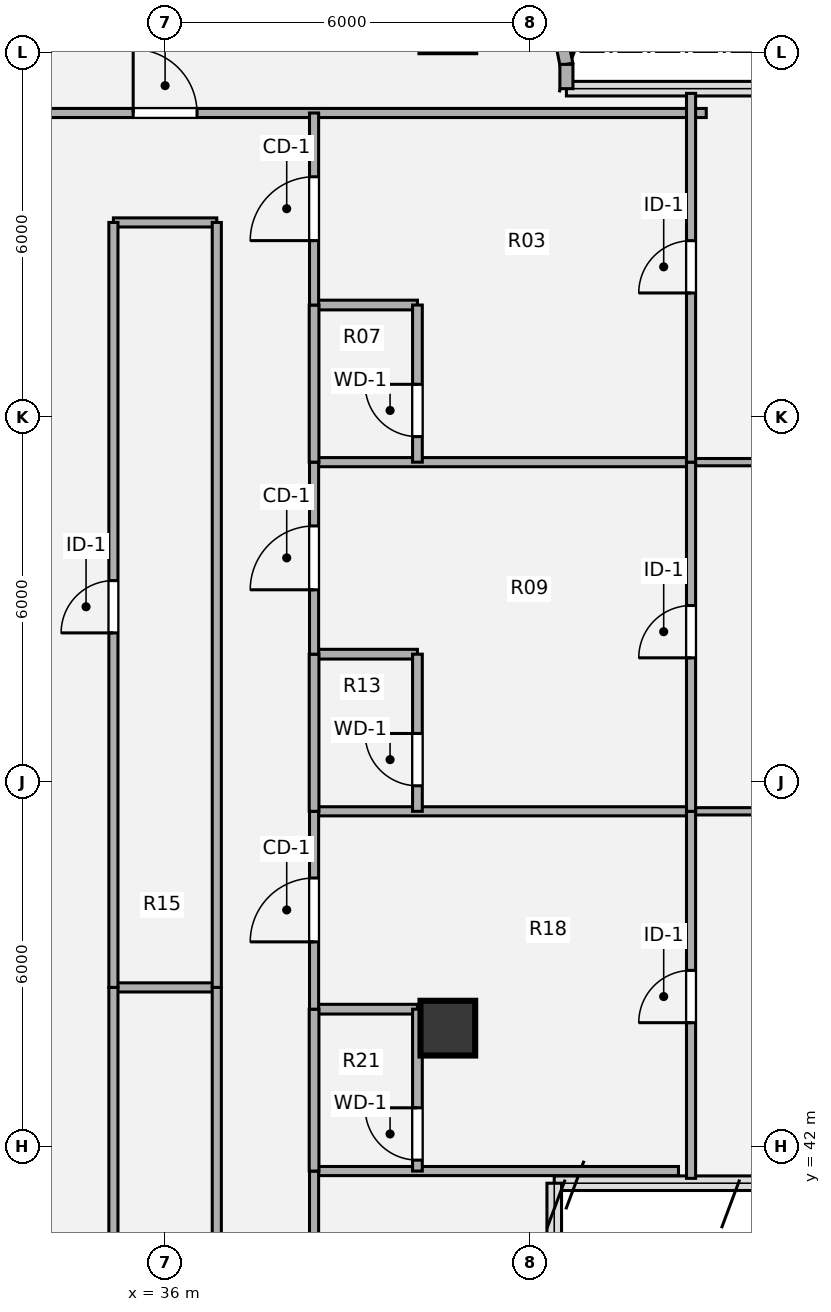
"""IFC4 building model, lengths in metres.
Left out: names, types, materials, properties, quantities, classifications, styles, units other than length and angle.
Written with IfcOpenShell. Run it as: python <this file> out.ifc"""

import sys

from ifc_helpers import new_model, si_unit, direction, frame, frame_2d, origin, origin_2d, place, context, subcontext, project, spatial, rectangle, hollow_circle, extrude, source, transform, mapped, element, fill, save


model = new_model("IFC4")
c1 = context("Model", 3, precision=1e-05, world=origin(), true_north=direction((0.0, 1.0)))
c2 = subcontext(c1, "Body", "Model", "MODEL_VIEW")
j1 = project(units=[si_unit("LENGTHUNIT", "METRE"), si_unit("PLANEANGLEUNIT", "RADIAN")], contexts=[c1])
p1 = place(None, origin())
s1 = spatial("IfcSite", under=j1, at=p1, CompositionType="ELEMENT")
p2 = place(p1, origin())
s2 = spatial("IfcBuilding", under=s1, at=p2, CompositionType="ELEMENT")
p3 = place(p2, frame((0.0, 0.0, 238.14)))
s3 = spatial("IfcBuildingStorey", under=s2, at=p3, CompositionType="ELEMENT", Elevation=238.14)
m1 = source(origin(), c2, "Body", "SweptSolid", [
    extrude(hollow_circle(Radius=0.45, WallThickness=0.032, at=origin_2d()), origin(), (0.0, 0.0, 1.0), 3.78),
])
p4 = place(p3, frame((40.65, 43.95, 0.0), z_axis=(0.0, 0.0, 1.0), x_axis=(1.0, 0.0, 0.0)))
e1 = element("IfcColumn", 1, at=p4, inside=s3, PredefinedType="COLUMN", context=c2, shape_type="MappedRepresentation", body=[
    mapped(m1, transform((0.0, 0.0, 0.0), x_axis=(1.0, 0.0, 0.0), y_axis=(0.0, 1.0, 0.0), z_axis=(0.0, 0.0, 1.0), scale=1.0)),
])
p5 = place(p3, frame((42.402, 60.795, 0.0), z_axis=(0.0, 0.0, 1.0), x_axis=(0.195190360752, -0.980765376158, 0.0)))
e2 = element("IfcWall", 2, at=p5, inside=s3, PredefinedType="SOLIDWALL", context=c2, shape_type="SweptSolid", body=[
    extrude(rectangle(XDim=1.014, YDim=0.215, at=frame_2d((0.507, 0.0))), origin(), (0.0, 0.0, 1.0), 3.53),
])
p6 = place(p3, frame((42.6, 59.8, 0.0), z_axis=(0.0, 0.0, 1.0), x_axis=(0.0, -1.0, 0.0)))
e3 = element("IfcWall", 3, at=p6, inside=s3, PredefinedType="SOLIDWALL", context=c2, shape_type="SweptSolid", body=[
    extrude(rectangle(XDim=0.4, YDim=0.215, at=frame_2d((0.2, 0.0))), origin(), (0.0, 0.0, 1.0), 3.53),
])
p7 = place(p3, frame((38.45, 41.6, 0.0), z_axis=(0.0, 0.0, 1.0), x_axis=(1.0, 0.0, 0.0)))
e4 = element("IfcWall", 4, at=p7, inside=s3, PredefinedType="PARTITIONING", context=c2, shape_type="SweptSolid", body=[
    extrude(rectangle(XDim=5.993, YDim=0.15, at=frame_2d((2.997, 0.0))), origin(), (0.0, 0.0, 1.0), 3.5),
])
p8 = place(p3, frame((38.45, 44.262, 0.0), z_axis=(0.0, 0.0, 1.0), x_axis=(1.0, 0.0, 0.0)))
e5 = element("IfcWall", 5, at=p8, inside=s3, PredefinedType="PLUMBINGWALL", context=c2, shape_type="SweptSolid", body=[
    extrude(rectangle(XDim=1.7, YDim=0.16, at=frame_2d((0.85, 0.0))), origin(), (0.0, 0.0, 1.0), 2.903),
])
p9 = place(p3, frame((35.15, 44.62, 0.0), z_axis=(0.0, 0.0, 1.0), x_axis=(1.0, 0.0, 0.0)))
e6 = element("IfcWall", 6, at=p9, inside=s3, PredefinedType="PARTITIONING", context=c2, shape_type="SweptSolid", body=[
    extrude(rectangle(XDim=1.7, YDim=0.15, at=frame_2d((0.85, 0.0))), origin(), (0.0, 0.0, 1.0), 3.259),
])
p10 = place(p3, frame((38.45, 47.516, 0.0), z_axis=(0.0, 0.0, 1.0), x_axis=(1.0, 0.0, 0.0)))
e7 = element("IfcWall", 7, at=p10, inside=s3, PredefinedType="PARTITIONING", context=c2, shape_type="SweptSolid", body=[
    extrude(rectangle(XDim=6.2, YDim=0.15, at=frame_2d((3.1, 0.0))), origin(), (0.0, 0.0, 1.0), 2.982),
])
p11 = place(p3, frame((44.65, 47.516, 0.0), z_axis=(0.0, 0.0, 1.0), x_axis=(1.0, 0.0, 0.0)))
e8 = element("IfcWall", 8, at=p11, inside=s3, PredefinedType="PARTITIONING", context=c2, shape_type="SweptSolid", body=[
    extrude(rectangle(XDim=9.57, YDim=0.12, at=frame_2d((4.785, 0.0))), origin(), (0.0, 0.0, 1.0), 2.982),
])
p12 = place(p3, frame((38.45, 50.1, 0.0), z_axis=(0.0, 0.0, 1.0), x_axis=(1.0, 0.0, 0.0)))
e9 = element("IfcWall", 9, at=p12, inside=s3, PredefinedType="PLUMBINGWALL", context=c2, shape_type="SweptSolid", body=[
    extrude(rectangle(XDim=1.7, YDim=0.16, at=frame_2d((0.85, 0.0))), origin(), (0.0, 0.0, 1.0), 3.259),
])
p13 = place(p3, frame((38.45, 53.258, 0.0), z_axis=(0.0, 0.0, 1.0), x_axis=(1.0, 0.0, 0.0)))
e10 = element("IfcWall", 10, at=p13, inside=s3, PredefinedType="PARTITIONING", context=c2, shape_type="SweptSolid", body=[
    extrude(rectangle(XDim=6.2, YDim=0.15, at=frame_2d((3.1, 0.0))), origin(), (0.0, 0.0, 1.0), 3.055),
])
p14 = place(p3, frame((44.65, 53.258, 0.0), z_axis=(0.0, 0.0, 1.0), x_axis=(1.0, 0.0, 0.0)))
e11 = element("IfcWall", 11, at=p14, inside=s3, PredefinedType="PARTITIONING", context=c2, shape_type="SweptSolid", body=[
    extrude(rectangle(XDim=9.57, YDim=0.12, at=frame_2d((4.785, 0.0))), origin(), (0.0, 0.0, 1.0), 3.055),
])
p15 = place(p3, frame((38.45, 55.842, 0.0), z_axis=(0.0, 0.0, 1.0), x_axis=(1.0, 0.0, 0.0)))
e12 = element("IfcWall", 12, at=p15, inside=s3, PredefinedType="PLUMBINGWALL", context=c2, shape_type="SweptSolid", body=[
    extrude(rectangle(XDim=1.7, YDim=0.16, at=frame_2d((0.85, 0.0))), origin(), (0.0, 0.0, 1.0), 3.259),
])
p16 = place(p3, frame((35.15, 57.2, 0.0), z_axis=(0.0, 0.0, 1.0), x_axis=(1.0, 0.0, 0.0)))
e13 = element("IfcWall", 13, at=p16, inside=s3, PredefinedType="PARTITIONING", context=c2, shape_type="SweptSolid", body=[
    extrude(rectangle(XDim=1.7, YDim=0.15, at=frame_2d((0.85, 0.0))), origin(), (0.0, 0.0, 1.0), 3.308),
])
p17 = place(p3, frame((27.1, 59.0, 0.0), z_axis=(0.0, 0.0, 1.0), x_axis=(1.0, 0.0, 0.0)))
e14 = element("IfcWall", 14, at=p17, inside=s3, PredefinedType="PARTITIONING", context=c2, shape_type="SweptSolid", body=[
    extrude(rectangle(XDim=17.8, YDim=0.15, at=frame_2d((8.9, 0.0))), origin(), (0.0, 0.0, 1.0), 3.308),
])
p18 = place(p17, frame((8.375, 0.0, 0.0)))
e15 = element("IfcOpeningElement", 15, at=p18, cuts=e14, PredefinedType="OPENING", context=c2, shape_type="SweptSolid", body=[
    extrude(rectangle(XDim=1.05, YDim=2.1, at=origin_2d()), frame((0.525, 0.085, 1.05), z_axis=(0.0, -1.0, 0.0), x_axis=(1.0, 0.0, 0.0)), (0.0, 0.0, 1.0), 0.17),
])
p19 = place(p3, frame((35.15, 25.2, 0.0), z_axis=(0.0, 0.0, 1.0), x_axis=(0.0, 1.0, 0.0)))
e16 = element("IfcWall", 16, at=p19, inside=s3, PredefinedType="PARTITIONING", context=c2, shape_type="SweptSolid", body=[
    extrude(rectangle(XDim=19.42, YDim=0.15, at=frame_2d((9.71, 0.0))), origin(), (0.0, 0.0, 1.0), 3.5),
])
p20 = place(p3, frame((35.15, 44.62, 0.0), z_axis=(0.0, 0.0, 1.0), x_axis=(0.0, 1.0, 0.0)))
e17 = element("IfcWall", 17, at=p20, inside=s3, PredefinedType="PARTITIONING", context=c2, shape_type="SweptSolid", body=[
    extrude(rectangle(XDim=12.58, YDim=0.15, at=frame_2d((6.29, 0.0))), origin(), (0.0, 0.0, 1.0), 3.5),
])
p21 = place(p20, frame((5.83, 0.0, 0.0)))
e18 = element("IfcOpeningElement", 18, at=p21, cuts=e17, PredefinedType="OPENING", context=c2, shape_type="SweptSolid", body=[
    extrude(rectangle(XDim=0.86, YDim=2.1, at=origin_2d()), frame((0.43, 0.085, 1.05), z_axis=(0.0, -1.0, 0.0), x_axis=(1.0, 0.0, 0.0)), (0.0, 0.0, 1.0), 0.17),
])
p22 = place(p3, frame((36.85, 25.2, 0.0), z_axis=(0.0, 0.0, 1.0), x_axis=(0.0, 1.0, 0.0)))
e19 = element("IfcWall", 19, at=p22, inside=s3, PredefinedType="PARTITIONING", context=c2, shape_type="SweptSolid", body=[
    extrude(rectangle(XDim=19.42, YDim=0.15, at=frame_2d((9.71, 0.0))), origin(), (0.0, 0.0, 1.0), 3.5),
])
p23 = place(p22, frame((9.185, 0.0, 0.0)))
e20 = element("IfcOpeningElement", 20, at=p23, cuts=e19, PredefinedType="OPENING", context=c2, shape_type="SweptSolid", body=[
    extrude(rectangle(XDim=1.05, YDim=2.1, at=origin_2d()), frame((0.525, 0.085, 1.05), z_axis=(0.0, -1.0, 0.0), x_axis=(1.0, 0.0, 0.0)), (0.0, 0.0, 1.0), 0.17),
])
p24 = place(p3, frame((36.85, 44.62, 0.0), z_axis=(0.0, 0.0, 1.0), x_axis=(0.0, 1.0, 0.0)))
e21 = element("IfcWall", 21, at=p24, inside=s3, PredefinedType="PARTITIONING", context=c2, shape_type="SweptSolid", body=[
    extrude(rectangle(XDim=12.58, YDim=0.15, at=frame_2d((6.29, 0.0))), origin(), (0.0, 0.0, 1.0), 3.5),
])
p25 = place(p3, frame((38.45, 21.2, 0.0), z_axis=(0.0, 0.0, 1.0), x_axis=(0.0, 1.0, 0.0)))
e22 = element("IfcWall", 22, at=p25, inside=s3, PredefinedType="PARTITIONING", context=c2, shape_type="SweptSolid", body=[
    extrude(rectangle(XDim=20.4, YDim=0.15, at=frame_2d((10.2, 0.0))), origin(), (0.0, 0.0, 1.0), 3.5),
])
p26 = place(p25, frame((9.575, 0.0, 0.0)))
e23 = element("IfcOpeningElement", 23, at=p26, cuts=e22, PredefinedType="OPENING", context=c2, shape_type="SweptSolid", body=[
    extrude(rectangle(XDim=1.05, YDim=2.1, at=origin_2d()), frame((0.525, 0.085, 1.05), z_axis=(0.0, -1.0, 0.0), x_axis=(1.0, 0.0, 0.0)), (0.0, 0.0, 1.0), 0.17),
])
p27 = place(p3, frame((38.45, 41.6, 0.0), z_axis=(0.0, 0.0, 1.0), x_axis=(0.0, 1.0, 0.0)))
e24 = element("IfcWall", 24, at=p27, inside=s3, PredefinedType="PLUMBINGWALL", context=c2, shape_type="SweptSolid", body=[
    extrude(rectangle(XDim=2.662, YDim=0.16, at=frame_2d((1.331, 0.0))), origin(), (0.0, 0.0, 1.0), 3.5),
])
p28 = place(p3, frame((38.45, 44.262, 0.0), z_axis=(0.0, 0.0, 1.0), x_axis=(0.0, 1.0, 0.0)))
e25 = element("IfcWall", 25, at=p28, inside=s3, PredefinedType="PARTITIONING", context=c2, shape_type="SweptSolid", body=[
    extrude(rectangle(XDim=3.254, YDim=0.15, at=frame_2d((1.627, 0.0))), origin(), (0.0, 0.0, 1.0), 3.5),
])
p29 = place(p28, frame((1.107, 0.0, 0.0)))
e26 = element("IfcOpeningElement", 26, at=p29, cuts=e25, PredefinedType="OPENING", context=c2, shape_type="SweptSolid", body=[
    extrude(rectangle(XDim=1.05, YDim=2.1, at=origin_2d()), frame((0.525, 0.085, 1.05), z_axis=(0.0, -1.0, 0.0), x_axis=(1.0, 0.0, 0.0)), (0.0, 0.0, 1.0), 0.17),
])
p30 = place(p3, frame((38.45, 47.516, 0.0), z_axis=(0.0, 0.0, 1.0), x_axis=(0.0, 1.0, 0.0)))
e27 = element("IfcWall", 27, at=p30, inside=s3, PredefinedType="PLUMBINGWALL", context=c2, shape_type="SweptSolid", body=[
    extrude(rectangle(XDim=2.584, YDim=0.16, at=frame_2d((1.292, 0.0))), origin(), (0.0, 0.0, 1.0), 3.5),
])
p31 = place(p3, frame((38.45, 50.1, 0.0), z_axis=(0.0, 0.0, 1.0), x_axis=(0.0, 1.0, 0.0)))
e28 = element("IfcWall", 28, at=p31, inside=s3, PredefinedType="PARTITIONING", context=c2, shape_type="SweptSolid", body=[
    extrude(rectangle(XDim=3.158, YDim=0.15, at=frame_2d((1.579, 0.0))), origin(), (0.0, 0.0, 1.0), 3.5),
])
p32 = place(p31, frame((1.059, 0.0, 0.0)))
e29 = element("IfcOpeningElement", 29, at=p32, cuts=e28, PredefinedType="OPENING", context=c2, shape_type="SweptSolid", body=[
    extrude(rectangle(XDim=1.05, YDim=2.1, at=origin_2d()), frame((0.525, 0.085, 1.05), z_axis=(0.0, -1.0, 0.0), x_axis=(1.0, 0.0, 0.0)), (0.0, 0.0, 1.0), 0.17),
])
p33 = place(p3, frame((38.45, 53.258, 0.0), z_axis=(0.0, 0.0, 1.0), x_axis=(0.0, 1.0, 0.0)))
e30 = element("IfcWall", 30, at=p33, inside=s3, PredefinedType="PLUMBINGWALL", context=c2, shape_type="SweptSolid", body=[
    extrude(rectangle(XDim=2.584, YDim=0.16, at=frame_2d((1.292, 0.0))), origin(), (0.0, 0.0, 1.0), 3.5),
])
p34 = place(p3, frame((38.45, 55.842, 0.0), z_axis=(0.0, 0.0, 1.0), x_axis=(0.0, 1.0, 0.0)))
e31 = element("IfcWall", 31, at=p34, inside=s3, PredefinedType="PARTITIONING", context=c2, shape_type="SweptSolid", body=[
    extrude(rectangle(XDim=3.158, YDim=0.15, at=frame_2d((1.579, 0.0))), origin(), (0.0, 0.0, 1.0), 3.5),
])
p35 = place(p34, frame((1.059, 0.0, 0.0)))
e32 = element("IfcOpeningElement", 32, at=p35, cuts=e31, PredefinedType="OPENING", context=c2, shape_type="SweptSolid", body=[
    extrude(rectangle(XDim=1.05, YDim=2.1, at=origin_2d()), frame((0.525, 0.085, 1.05), z_axis=(0.0, -1.0, 0.0), x_axis=(1.0, 0.0, 0.0)), (0.0, 0.0, 1.0), 0.17),
])
p36 = place(p3, frame((40.15, 41.6, 0.0), z_axis=(0.0, 0.0, 1.0), x_axis=(0.0, 1.0, 0.0)))
e33 = element("IfcWall", 33, at=p36, inside=s3, PredefinedType="PLUMBINGWALL", context=c2, shape_type="SweptSolid", body=[
    extrude(rectangle(XDim=2.662, YDim=0.16, at=frame_2d((1.331, 0.0))), origin(), (0.0, 0.0, 1.0), 3.5),
])
p37 = place(p36, frame((0.18, 0.0, 0.0)))
e34 = element("IfcOpeningElement", 34, at=p37, cuts=e33, PredefinedType="OPENING", context=c2, shape_type="SweptSolid", body=[
    extrude(rectangle(XDim=0.86, YDim=2.1, at=origin_2d()), frame((0.43, 0.09, 1.05), z_axis=(0.0, -1.0, 0.0), x_axis=(1.0, 0.0, 0.0)), (0.0, 0.0, 1.0), 0.18),
])
p38 = place(p3, frame((40.15, 47.516, 0.0), z_axis=(0.0, 0.0, 1.0), x_axis=(0.0, 1.0, 0.0)))
e35 = element("IfcWall", 35, at=p38, inside=s3, PredefinedType="PLUMBINGWALL", context=c2, shape_type="SweptSolid", body=[
    extrude(rectangle(XDim=2.584, YDim=0.16, at=frame_2d((1.292, 0.0))), origin(), (0.0, 0.0, 1.0), 3.5),
])
p39 = place(p38, frame((0.42, 0.0, 0.0)))
e36 = element("IfcOpeningElement", 36, at=p39, cuts=e35, PredefinedType="OPENING", context=c2, shape_type="SweptSolid", body=[
    extrude(rectangle(XDim=0.86, YDim=2.1, at=origin_2d()), frame((0.43, 0.09, 1.05), z_axis=(0.0, -1.0, 0.0), x_axis=(1.0, 0.0, 0.0)), (0.0, 0.0, 1.0), 0.18),
])
p40 = place(p3, frame((40.15, 53.258, 0.0), z_axis=(0.0, 0.0, 1.0), x_axis=(0.0, 1.0, 0.0)))
e37 = element("IfcWall", 37, at=p40, inside=s3, PredefinedType="PLUMBINGWALL", context=c2, shape_type="SweptSolid", body=[
    extrude(rectangle(XDim=2.584, YDim=0.16, at=frame_2d((1.292, 0.0))), origin(), (0.0, 0.0, 1.0), 3.5),
])
p41 = place(p40, frame((0.42, 0.0, 0.0)))
e38 = element("IfcOpeningElement", 38, at=p41, cuts=e37, PredefinedType="OPENING", context=c2, shape_type="SweptSolid", body=[
    extrude(rectangle(XDim=0.86, YDim=2.1, at=origin_2d()), frame((0.43, 0.09, 1.05), z_axis=(0.0, -1.0, 0.0), x_axis=(1.0, 0.0, 0.0)), (0.0, 0.0, 1.0), 0.18),
])
p42 = place(p3, frame((44.65, 41.48, 0.0), z_axis=(0.0, 0.0, 1.0), x_axis=(0.0, 1.0, 0.0)))
e39 = element("IfcWall", 39, at=p42, inside=s3, PredefinedType="PARTITIONING", context=c2, shape_type="SweptSolid", body=[
    extrude(rectangle(XDim=6.036, YDim=0.15, at=frame_2d((3.018, 0.0))), origin(), (0.0, 0.0, 1.0), 3.5),
])
p43 = place(p42, frame((2.56, 0.0, 0.0)))
e40 = element("IfcOpeningElement", 40, at=p43, cuts=e39, PredefinedType="OPENING", context=c2, shape_type="SweptSolid", body=[
    extrude(rectangle(XDim=0.86, YDim=2.1, at=origin_2d()), frame((0.43, 0.085, 1.05), z_axis=(0.0, -1.0, 0.0), x_axis=(1.0, 0.0, 0.0)), (0.0, 0.0, 1.0), 0.17),
])
p44 = place(p3, frame((44.65, 47.516, 0.0), z_axis=(0.0, 0.0, 1.0), x_axis=(0.0, 1.0, 0.0)))
e41 = element("IfcWall", 41, at=p44, inside=s3, PredefinedType="PARTITIONING", context=c2, shape_type="SweptSolid", body=[
    extrude(rectangle(XDim=5.742, YDim=0.15, at=frame_2d((2.871, 0.0))), origin(), (0.0, 0.0, 1.0), 3.5),
])
p45 = place(p44, frame((2.524, 0.0, 0.0)))
e42 = element("IfcOpeningElement", 42, at=p45, cuts=e41, PredefinedType="OPENING", context=c2, shape_type="SweptSolid", body=[
    extrude(rectangle(XDim=0.86, YDim=2.1, at=origin_2d()), frame((0.43, 0.085, 1.05), z_axis=(0.0, -1.0, 0.0), x_axis=(1.0, 0.0, 0.0)), (0.0, 0.0, 1.0), 0.17),
])
p46 = place(p3, frame((44.65, 53.258, 0.0), z_axis=(0.0, 0.0, 1.0), x_axis=(0.0, 1.0, 0.0)))
e43 = element("IfcWall", 43, at=p46, inside=s3, PredefinedType="PARTITIONING", context=c2, shape_type="SweptSolid", body=[
    extrude(rectangle(XDim=6.064, YDim=0.15, at=frame_2d((3.032, 0.0))), origin(), (0.0, 0.0, 1.0), 3.5),
])
p47 = place(p46, frame((2.782, 0.0, 0.0)))
e44 = element("IfcOpeningElement", 44, at=p47, cuts=e43, PredefinedType="OPENING", context=c2, shape_type="SweptSolid", body=[
    extrude(rectangle(XDim=0.86, YDim=2.1, at=origin_2d()), frame((0.43, 0.085, 1.05), z_axis=(0.0, -1.0, 0.0), x_axis=(1.0, 0.0, 0.0)), (0.0, 0.0, 1.0), 0.17),
])
m2 = source(origin(), c2, "Body", "SweptSolid", [
    extrude(rectangle(XDim=1.05, YDim=2.1, at=origin_2d()), frame((0.525, 0.025, 1.05), z_axis=(0.0, -1.0, 0.0), x_axis=(1.0, 0.0, 0.0)), (0.0, 0.0, 1.0), 0.05),
])
p48 = place(p18, origin())
e45 = element("IfcDoor", 45, at=p48, inside=s3, OperationType="SINGLE_SWING_LEFT", PredefinedType="DOOR", context=c2, shape_type="MappedRepresentation", body=[
    mapped(m2, transform((0.0, 0.0, 0.0), x_axis=(1.0, 0.0, 0.0), y_axis=(0.0, 1.0, 0.0), z_axis=(0.0, 0.0, 1.0), scale=1.0)),
])
fill(e15, e45)
m3 = source(origin(), c2, "Body", "SweptSolid", [
    extrude(rectangle(XDim=0.86, YDim=2.1, at=origin_2d()), frame((0.43, 0.025, 1.05), z_axis=(0.0, -1.0, 0.0), x_axis=(1.0, 0.0, 0.0)), (0.0, 0.0, 1.0), 0.05),
])
p49 = place(p21, origin())
e46 = element("IfcDoor", 46, at=p49, inside=s3, OperationType="SINGLE_SWING_LEFT", PredefinedType="DOOR", context=c2, shape_type="MappedRepresentation", body=[
    mapped(m3, transform((0.0, 0.0, 0.0), x_axis=(1.0, 0.0, 0.0), y_axis=(0.0, 1.0, 0.0), z_axis=(0.0, 0.0, 1.0), scale=1.0)),
])
fill(e18, e46)
m4 = source(origin(), c2, "Body", "SweptSolid", [
    extrude(rectangle(XDim=1.05, YDim=2.1, at=origin_2d()), frame((0.525, 0.025, 1.05), z_axis=(0.0, -1.0, 0.0), x_axis=(1.0, 0.0, 0.0)), (0.0, 0.0, 1.0), 0.05),
])
p50 = place(p29, origin())
e47 = element("IfcDoor", 47, at=p50, inside=s3, OperationType="SINGLE_SWING_LEFT", PredefinedType="DOOR", context=c2, shape_type="MappedRepresentation", body=[
    mapped(m4, transform((0.0, 0.0, 0.0), x_axis=(1.0, 0.0, 0.0), y_axis=(0.0, 1.0, 0.0), z_axis=(0.0, 0.0, 1.0), scale=1.0)),
])
fill(e26, e47)
p51 = place(p32, origin())
e48 = element("IfcDoor", 48, at=p51, inside=s3, OperationType="SINGLE_SWING_LEFT", PredefinedType="DOOR", context=c2, shape_type="MappedRepresentation", body=[
    mapped(m4, transform((0.0, 0.0, 0.0), x_axis=(1.0, 0.0, 0.0), y_axis=(0.0, 1.0, 0.0), z_axis=(0.0, 0.0, 1.0), scale=1.0)),
])
fill(e29, e48)
p52 = place(p35, origin())
e49 = element("IfcDoor", 49, at=p52, inside=s3, OperationType="SINGLE_SWING_LEFT", PredefinedType="DOOR", context=c2, shape_type="MappedRepresentation", body=[
    mapped(m4, transform((0.0, 0.0, 0.0), x_axis=(1.0, 0.0, 0.0), y_axis=(0.0, 1.0, 0.0), z_axis=(0.0, 0.0, 1.0), scale=1.0)),
])
fill(e32, e49)
m5 = source(origin(), c2, "Body", "SweptSolid", [
    extrude(rectangle(XDim=0.86, YDim=2.1, at=origin_2d()), frame((0.43, 0.025, 1.05), z_axis=(0.0, -1.0, 0.0), x_axis=(1.0, 0.0, 0.0)), (0.0, 0.0, 1.0), 0.05),
])
p53 = place(p37, origin())
e50 = element("IfcDoor", 50, at=p53, inside=s3, OperationType="SINGLE_SWING_RIGHT", PredefinedType="DOOR", context=c2, shape_type="MappedRepresentation", body=[
    mapped(m5, transform((0.0, 0.0, 0.0), x_axis=(1.0, 0.0, 0.0), y_axis=(0.0, 1.0, 0.0), z_axis=(0.0, 0.0, 1.0), scale=1.0)),
])
fill(e34, e50)
p54 = place(p39, origin())
e51 = element("IfcDoor", 51, at=p54, inside=s3, OperationType="SINGLE_SWING_RIGHT", PredefinedType="DOOR", context=c2, shape_type="MappedRepresentation", body=[
    mapped(m5, transform((0.0, 0.0, 0.0), x_axis=(1.0, 0.0, 0.0), y_axis=(0.0, 1.0, 0.0), z_axis=(0.0, 0.0, 1.0), scale=1.0)),
])
fill(e36, e51)
p55 = place(p41, origin())
e52 = element("IfcDoor", 52, at=p55, inside=s3, OperationType="SINGLE_SWING_RIGHT", PredefinedType="DOOR", context=c2, shape_type="MappedRepresentation", body=[
    mapped(m5, transform((0.0, 0.0, 0.0), x_axis=(1.0, 0.0, 0.0), y_axis=(0.0, 1.0, 0.0), z_axis=(0.0, 0.0, 1.0), scale=1.0)),
])
fill(e38, e52)
p56 = place(p43, origin())
e53 = element("IfcDoor", 53, at=p56, inside=s3, OperationType="SINGLE_SWING_LEFT", PredefinedType="DOOR", context=c2, shape_type="MappedRepresentation", body=[
    mapped(m3, transform((0.0, 0.0, 0.0), x_axis=(1.0, 0.0, 0.0), y_axis=(0.0, 1.0, 0.0), z_axis=(0.0, 0.0, 1.0), scale=1.0)),
])
fill(e40, e53)
p57 = place(p45, origin())
e54 = element("IfcDoor", 54, at=p57, inside=s3, OperationType="SINGLE_SWING_LEFT", PredefinedType="DOOR", context=c2, shape_type="MappedRepresentation", body=[
    mapped(m3, transform((0.0, 0.0, 0.0), x_axis=(1.0, 0.0, 0.0), y_axis=(0.0, 1.0, 0.0), z_axis=(0.0, 0.0, 1.0), scale=1.0)),
])
fill(e42, e54)
p58 = place(p47, origin())
e55 = element("IfcDoor", 55, at=p58, inside=s3, OperationType="SINGLE_SWING_LEFT", PredefinedType="DOOR", context=c2, shape_type="MappedRepresentation", body=[
    mapped(m3, transform((0.0, 0.0, 0.0), x_axis=(1.0, 0.0, 0.0), y_axis=(0.0, 1.0, 0.0), z_axis=(0.0, 0.0, 1.0), scale=1.0)),
])
fill(e44, e55)
save(model, sys.argv[1])
